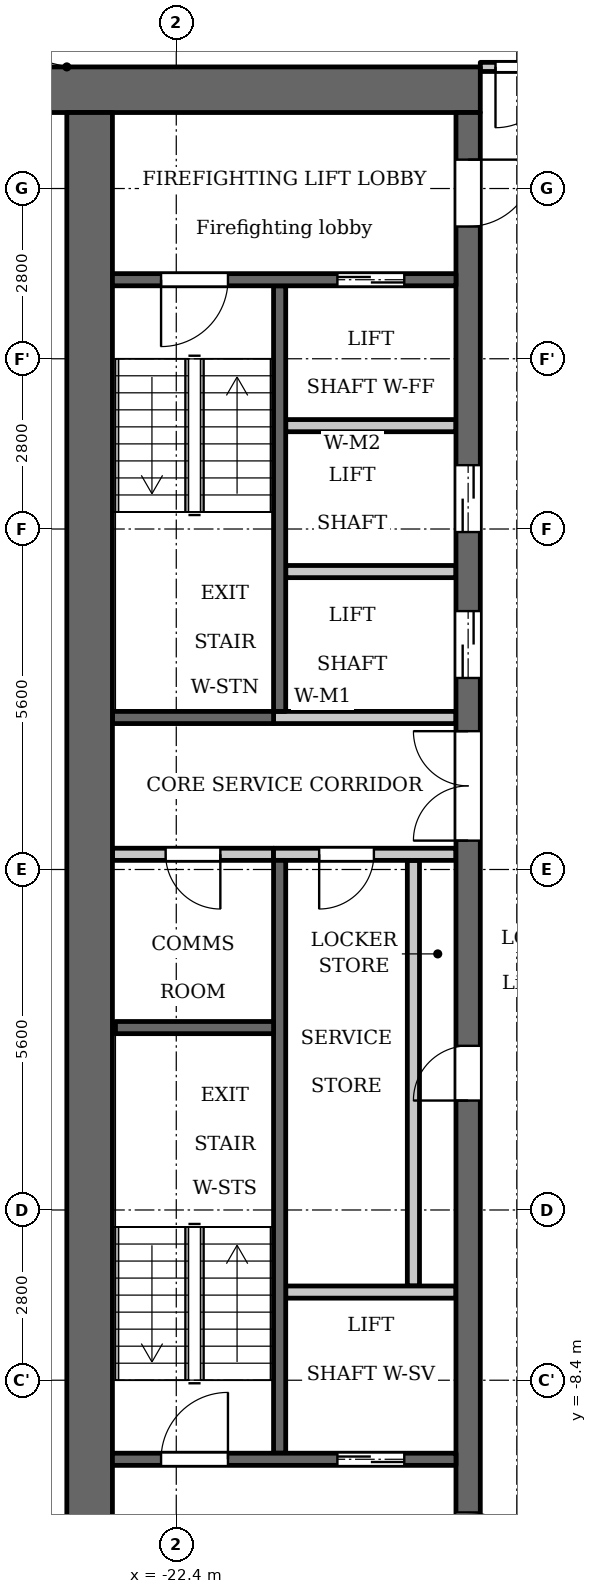
"""IFC4 building model, lengths in metres.
Left out: names, types, materials, properties, quantities, classifications, styles, units other than length and angle.
Written with IfcOpenShell. Run it as: python <this file> out.ifc"""

import sys

from ifc_helpers import new_model, si_unit, direction, frame, frame_2d, origin, place, context, subcontext, project, spatial, rectangle, extrude, element, fill, save


model = new_model("IFC4")
c1 = context("Model", 3, precision=1e-05, world=origin(), true_north=direction((0.0, 1.0)))
c2 = subcontext(c1, "Body", "Model", "MODEL_VIEW")
j1 = project(units=[si_unit("LENGTHUNIT", "METRE"), si_unit("PLANEANGLEUNIT", "RADIAN")], contexts=[c1])
p1 = place(None, origin())
s1 = spatial("IfcSite", under=j1, at=p1, CompositionType="ELEMENT")
p2 = place(p1, origin())
s2 = spatial("IfcBuilding", under=s1, at=p2, CompositionType="ELEMENT")
p3 = place(p2, frame((0.0, 0.0, 202.9)))
s3 = spatial("IfcBuildingStorey", under=s2, at=p3, CompositionType="ELEMENT", Elevation=202.9)
p4 = place(p3, frame((-20.7, 2.6, 0.0), z_axis=(0.0, 0.0, 1.0), x_axis=(0.0, 1.0, 0.0)))
e1 = element("IfcWall", 1, at=p4, inside=s3, PredefinedType="SHEAR", context=c2, shape_type="SweptSolid", body=[
    extrude(rectangle(XDim=7.0, YDim=0.2, at=frame_2d((3.5, 0.0))), origin(), (0.0, 0.0, 1.0), 3.2),
])
p5 = place(p3, frame((-20.7, -9.6, 0.0), z_axis=(0.0, 0.0, 1.0), x_axis=(0.0, 1.0, 0.0)))
e2 = element("IfcWall", 2, at=p5, inside=s3, PredefinedType="SHEAR", context=c2, shape_type="SweptSolid", body=[
    extrude(rectangle(XDim=9.75, YDim=0.2, at=frame_2d((4.875, 0.0))), origin(), (0.0, 0.0, 1.0), 3.2),
])
p6 = place(p3, frame((-20.8, 2.5, 0.0), z_axis=(0.0, 0.0, 1.0), x_axis=(-1.0, 0.0, 0.0)))
e3 = element("IfcWall", 3, at=p6, inside=s3, PredefinedType="SHEAR", context=c2, shape_type="SweptSolid", body=[
    extrude(rectangle(XDim=2.65, YDim=0.2, at=frame_2d((1.325, 0.0))), origin(), (0.0, 0.0, 1.0), 3.2),
])
p7 = place(p3, frame((-20.8, 0.25, 0.0), z_axis=(0.0, 0.0, 1.0), x_axis=(-1.0, 0.0, 0.0)))
e4 = element("IfcWall", 4, at=p7, inside=s3, PredefinedType="PARTITIONING", context=c2, shape_type="SweptSolid", body=[
    extrude(rectangle(XDim=2.65, YDim=0.2, at=frame_2d((1.325, 0.0))), origin(), (0.0, 0.0, 1.0), 3.2),
])
p8 = place(p7, frame((0.875, 0.0, 0.0)))
e5 = element("IfcOpeningElement", 5, at=p8, cuts=e4, PredefinedType="OPENING", context=c2, shape_type="SweptSolid", body=[
    extrude(rectangle(XDim=0.9, YDim=2.1, at=frame_2d((0.45, 1.05))), frame((0.0, 0.11, 0.0), z_axis=(0.0, -1.0, 0.0), x_axis=(1.0, 0.0, 0.0)), (0.0, 0.0, 1.0), 0.22),
])
p9 = place(p3, frame((-17.4, 12.825, 0.0), z_axis=(0.0, 0.0, 1.0), x_axis=(-1.0, 0.0, 0.0)))
e6 = element("IfcWall", 6, at=p9, inside=s3, PredefinedType="SHEAR", context=c2, shape_type="SweptSolid", body=[
    extrude(rectangle(XDim=7.6, YDim=0.75, at=frame_2d((3.8, 0.0))), origin(), (0.0, 0.0, 1.0), 3.2),
])
p10 = place(p3, frame((-18.5, -6.85, 0.0), z_axis=(0.0, 0.0, 1.0), x_axis=(0.0, 1.0, 0.0)))
e7 = element("IfcWall", 7, at=p10, inside=s3, PredefinedType="PARTITIONING", context=c2, shape_type="SweptSolid", body=[
    extrude(rectangle(XDim=7.0, YDim=0.2, at=frame_2d((3.5, 0.0))), origin(), (0.0, 0.0, 1.0), 3.2),
])
p11 = place(p3, frame((-17.6, -12.45, 0.0), z_axis=(0.0, 0.0, 1.0), x_axis=(0.0, 1.0, 0.0)))
e8 = element("IfcWall", 8, at=p11, inside=s3, PredefinedType="SHEAR", context=c2, shape_type="SweptSolid", body=[
    extrude(rectangle(XDim=24.9, YDim=0.4, at=frame_2d((12.45, 0.0))), origin(), (0.0, 0.0, 1.0), 3.2),
])
p12 = place(p11, frame((8.65, 0.0, 0.0)))
e9 = element("IfcOpeningElement", 9, at=p12, cuts=e8, PredefinedType="OPENING", context=c2, shape_type="SweptSolid", body=[
    extrude(rectangle(XDim=0.9, YDim=2.1, at=frame_2d((0.45, 1.05))), frame((0.0, 0.21, 0.0), z_axis=(0.0, -1.0, 0.0), x_axis=(1.0, 0.0, 0.0)), (0.0, 0.0, 1.0), 0.42),
])
p13 = place(p11, frame((15.6, 0.0, 0.0)))
e10 = element("IfcOpeningElement", 10, at=p13, cuts=e8, PredefinedType="OPENING", context=c2, shape_type="SweptSolid", body=[
    extrude(rectangle(XDim=1.1, YDim=2.1, at=frame_2d((0.55, 1.05))), frame((0.0, 0.21, 0.0), z_axis=(0.0, -1.0, 0.0), x_axis=(1.0, 0.0, 0.0)), (0.0, 0.0, 1.0), 0.42),
])
p14 = place(p11, frame((18.0, 0.0, 0.0)))
e11 = element("IfcOpeningElement", 11, at=p14, cuts=e8, PredefinedType="OPENING", context=c2, shape_type="SweptSolid", body=[
    extrude(rectangle(XDim=1.1, YDim=2.1, at=frame_2d((0.55, 1.05))), frame((0.0, 0.21, 0.0), z_axis=(0.0, -1.0, 0.0), x_axis=(1.0, 0.0, 0.0)), (0.0, 0.0, 1.0), 0.42),
])
p15 = place(p11, frame((23.025, 0.0, 0.0)))
e12 = element("IfcOpeningElement", 12, at=p15, cuts=e8, PredefinedType="OPENING", context=c2, shape_type="SweptSolid", body=[
    extrude(rectangle(XDim=1.1, YDim=2.1, at=frame_2d((0.55, 1.05))), frame((0.0, 0.21, 0.0), z_axis=(0.0, -1.0, 0.0), x_axis=(1.0, 0.0, 0.0)), (0.0, 0.0, 1.0), 0.42),
])
p16 = place(p11, frame((0.775, 0.0, 0.0)))
e13 = element("IfcOpeningElement", 13, at=p16, cuts=e8, PredefinedType="OPENING", context=c2, shape_type="SweptSolid", body=[
    extrude(rectangle(XDim=1.1, YDim=2.1, at=frame_2d((0.55, 1.05))), frame((0.0, 0.21, 0.0), z_axis=(0.0, -1.0, 0.0), x_axis=(1.0, 0.0, 0.0)), (0.0, 0.0, 1.0), 0.42),
])
p17 = place(p11, frame((12.925, 0.0, 0.0)))
e14 = element("IfcOpeningElement", 14, at=p17, cuts=e8, PredefinedType="OPENING", context=c2, shape_type="SweptSolid", body=[
    extrude(rectangle(XDim=1.8, YDim=2.1, at=frame_2d((0.9, 1.05))), frame((0.0, 0.21, 0.0), z_axis=(0.0, -1.0, 0.0), x_axis=(1.0, 0.0, 0.0)), (0.0, 0.0, 1.0), 0.42),
])
p18 = place(p3, frame((-23.825, -12.45, 0.0), z_axis=(0.0, 0.0, 1.0), x_axis=(0.0, 1.0, 0.0)))
e15 = element("IfcWall", 15, at=p18, inside=s3, PredefinedType="SHEAR", context=c2, shape_type="SweptSolid", body=[
    extrude(rectangle(XDim=24.9, YDim=0.75, at=frame_2d((12.45, 0.0))), origin(), (0.0, 0.0, 1.0), 3.2),
])
p19 = place(p3, frame((-17.8, -9.7, 0.0), z_axis=(0.0, 0.0, 1.0), x_axis=(-1.0, 0.0, 0.0)))
e16 = element("IfcWall", 16, at=p19, inside=s3, PredefinedType="SHEAR", context=c2, shape_type="SweptSolid", body=[
    extrude(rectangle(XDim=5.65, YDim=0.2, at=frame_2d((2.825, 0.0))), origin(), (0.0, 0.0, 1.0), 3.2),
])
p20 = place(p19, frame((0.85, 0.0, 0.0)))
e17 = element("IfcOpeningElement", 17, at=p20, cuts=e16, PredefinedType="OPENING", context=c2, shape_type="SweptSolid", body=[
    extrude(rectangle(XDim=1.1, YDim=2.1, at=frame_2d((0.55, 1.05))), frame((0.0, 0.11, 0.0), z_axis=(0.0, -1.0, 0.0), x_axis=(1.0, 0.0, 0.0)), (0.0, 0.0, 1.0), 0.22),
])
p21 = place(p19, frame((3.75, 0.0, 0.0)))
e18 = element("IfcOpeningElement", 18, at=p21, cuts=e16, PredefinedType="OPENING", context=c2, shape_type="SweptSolid", body=[
    extrude(rectangle(XDim=1.1, YDim=2.1, at=frame_2d((0.55, 1.05))), frame((0.0, 0.11, 0.0), z_axis=(0.0, -1.0, 0.0), x_axis=(1.0, 0.0, 0.0)), (0.0, 0.0, 1.0), 0.22),
])
p22 = place(p3, frame((-17.8, -6.95, 0.0), z_axis=(0.0, 0.0, 1.0), x_axis=(-1.0, 0.0, 0.0)))
e19 = element("IfcWall", 19, at=p22, inside=s3, PredefinedType="PARTITIONING", context=c2, shape_type="SweptSolid", body=[
    extrude(rectangle(XDim=2.8, YDim=0.2, at=frame_2d((1.4, 0.0))), origin(), (0.0, 0.0, 1.0), 3.2),
])
p23 = place(p3, frame((-17.8, 0.25, 0.0), z_axis=(0.0, 0.0, 1.0), x_axis=(-1.0, 0.0, 0.0)))
e20 = element("IfcWall", 20, at=p23, inside=s3, PredefinedType="PARTITIONING", context=c2, shape_type="SweptSolid", body=[
    extrude(rectangle(XDim=3.0, YDim=0.2, at=frame_2d((1.5, 0.0))), origin(), (0.0, 0.0, 1.0), 3.2),
])
p24 = place(p23, frame((1.35, 0.0, 0.0)))
e21 = element("IfcOpeningElement", 21, at=p24, cuts=e20, PredefinedType="OPENING", context=c2, shape_type="SweptSolid", body=[
    extrude(rectangle(XDim=0.9, YDim=2.1, at=frame_2d((0.45, 1.05))), frame((0.0, 0.11, 0.0), z_axis=(0.0, -1.0, 0.0), x_axis=(1.0, 0.0, 0.0)), (0.0, 0.0, 1.0), 0.22),
])
p25 = place(p3, frame((-17.8, 2.5, 0.0), z_axis=(0.0, 0.0, 1.0), x_axis=(-1.0, 0.0, 0.0)))
e22 = element("IfcWall", 22, at=p25, inside=s3, PredefinedType="PARTITIONING", context=c2, shape_type="SweptSolid", body=[
    extrude(rectangle(XDim=3.0, YDim=0.2, at=frame_2d((1.5, 0.0))), origin(), (0.0, 0.0, 1.0), 3.2),
])
for number, where, z_axis, x_axis in (
    (23, (-17.8, 4.9, 0.0), (0.0, 0.0, 1.0), (-1.0, 0.0, 0.0)),
    (24, (-17.8, 7.3, 0.0), (0.0, 0.0, 1.0), (-1.0, 0.0, 0.0)),
):
    element("IfcWall", number, at=place(p3, frame(where, z_axis=z_axis, x_axis=x_axis)), inside=s3, PredefinedType="PARTITIONING", context=c2, shape_type="SweptSolid", body=[
        extrude(rectangle(XDim=2.8, YDim=0.2, at=frame_2d((1.4, 0.0))), origin(), (0.0, 0.0, 1.0), 3.2),
    ])
p26 = place(p3, frame((-17.8, 9.7, 0.0), z_axis=(0.0, 0.0, 1.0), x_axis=(-1.0, 0.0, 0.0)))
e25 = element("IfcWall", 25, at=p26, inside=s3, PredefinedType="SHEAR", context=c2, shape_type="SweptSolid", body=[
    extrude(rectangle(XDim=5.65, YDim=0.2, at=frame_2d((2.825, 0.0))), origin(), (0.0, 0.0, 1.0), 3.2),
])
p27 = place(p26, frame((0.85, 0.0, 0.0)))
e26 = element("IfcOpeningElement", 26, at=p27, cuts=e25, PredefinedType="OPENING", context=c2, shape_type="SweptSolid", body=[
    extrude(rectangle(XDim=1.1, YDim=2.1, at=frame_2d((0.55, 1.05))), frame((0.0, 0.11, 0.0), z_axis=(0.0, -1.0, 0.0), x_axis=(1.0, 0.0, 0.0)), (0.0, 0.0, 1.0), 0.22),
])
p28 = place(p26, frame((3.75, 0.0, 0.0)))
e27 = element("IfcOpeningElement", 27, at=p28, cuts=e25, PredefinedType="OPENING", context=c2, shape_type="SweptSolid", body=[
    extrude(rectangle(XDim=1.1, YDim=2.1, at=frame_2d((0.55, 1.05))), frame((0.0, 0.11, 0.0), z_axis=(0.0, -1.0, 0.0), x_axis=(1.0, 0.0, 0.0)), (0.0, 0.0, 1.0), 0.22),
])
p29 = place(p3, frame((-20.8, -2.6, 0.0), z_axis=(0.0, 0.0, 1.0), x_axis=(-1.0, 0.0, 0.0)))
e28 = element("IfcWall", 28, at=p29, inside=s3, PredefinedType="SHEAR", context=c2, shape_type="SweptSolid", body=[
    extrude(rectangle(XDim=2.6, YDim=0.2, at=frame_2d((1.3, 0.0))), origin(), (0.0, 0.0, 1.0), 3.2),
])
p30 = place(p3, frame((-17.4, 13.2, 0.0), z_axis=(0.0, 0.0, 1.0), x_axis=(1.0, 0.0, 0.0)))
e29 = element("IfcWall", 29, at=p30, inside=s3, PredefinedType="PARTITIONING", context=c2, shape_type="SweptSolid", body=[
    extrude(rectangle(XDim=34.8, YDim=0.15, at=frame_2d((17.4, 0.0))), origin(), (0.0, 0.0, 1.0), 3.2),
])
p31 = place(p30, frame((0.25, 0.0, 0.0)))
e30 = element("IfcOpeningElement", 30, at=p31, cuts=e29, PredefinedType="OPENING", context=c2, shape_type="SweptSolid", body=[
    extrude(rectangle(XDim=1.0, YDim=2.1, at=frame_2d((0.5, 1.05))), frame((0.0, 0.085, 0.0), z_axis=(0.0, -1.0, 0.0), x_axis=(1.0, 0.0, 0.0)), (0.0, 0.0, 1.0), 0.17),
])
p32 = place(p30, frame((33.65, 0.0, 0.0)))
e31 = element("IfcOpeningElement", 31, at=p32, cuts=e29, PredefinedType="OPENING", context=c2, shape_type="SweptSolid", body=[
    extrude(rectangle(XDim=1.0, YDim=2.1, at=frame_2d((0.5, 1.05))), frame((0.0, 0.085, 0.0), z_axis=(0.0, -1.0, 0.0), x_axis=(1.0, 0.0, 0.0)), (0.0, 0.0, 1.0), 0.17),
])
p33 = place(p20, origin())
e32 = element("IfcDoor", 32, at=p33, inside=s3, OperationType="DOUBLE_DOOR_SLIDING", PredefinedType="DOOR", context=c2, shape_type="SweptSolid", body=[
    extrude(rectangle(XDim=1.1, YDim=2.1, at=frame_2d((0.55, 1.05))), frame((0.0, 0.025, 0.0), z_axis=(0.0, -1.0, 0.0), x_axis=(1.0, 0.0, 0.0)), (0.0, 0.0, 1.0), 0.05),
])
fill(e17, e32)
p34 = place(p12, origin())
e33 = element("IfcDoor", 33, at=p34, inside=s3, OperationType="SINGLE_SWING_RIGHT", PredefinedType="DOOR", context=c2, shape_type="SweptSolid", body=[
    extrude(rectangle(XDim=0.9, YDim=2.1, at=frame_2d((0.45, 1.05))), frame((0.0, 0.025, 0.0), z_axis=(0.0, -1.0, 0.0), x_axis=(1.0, 0.0, 0.0)), (0.0, 0.0, 1.0), 0.05),
])
fill(e9, e33)
p35 = place(p24, origin())
e34 = element("IfcDoor", 34, at=p35, inside=s3, OperationType="SINGLE_SWING_LEFT", PredefinedType="DOOR", context=c2, shape_type="SweptSolid", body=[
    extrude(rectangle(XDim=0.9, YDim=2.1, at=frame_2d((0.45, 1.05))), frame((0.0, 0.025, 0.0), z_axis=(0.0, -1.0, 0.0), x_axis=(1.0, 0.0, 0.0)), (0.0, 0.0, 1.0), 0.05),
])
fill(e21, e34)
p36 = place(p13, origin())
e35 = element("IfcDoor", 35, at=p36, inside=s3, OperationType="DOUBLE_DOOR_SLIDING", PredefinedType="DOOR", context=c2, shape_type="SweptSolid", body=[
    extrude(rectangle(XDim=1.1, YDim=2.1, at=frame_2d((0.55, 1.05))), frame((0.0, 0.025, 0.0), z_axis=(0.0, -1.0, 0.0), x_axis=(1.0, 0.0, 0.0)), (0.0, 0.0, 1.0), 0.05),
])
fill(e10, e35)
p37 = place(p14, origin())
e36 = element("IfcDoor", 36, at=p37, inside=s3, OperationType="DOUBLE_DOOR_SLIDING", PredefinedType="DOOR", context=c2, shape_type="SweptSolid", body=[
    extrude(rectangle(XDim=1.1, YDim=2.1, at=frame_2d((0.55, 1.05))), frame((0.0, 0.025, 0.0), z_axis=(0.0, -1.0, 0.0), x_axis=(1.0, 0.0, 0.0)), (0.0, 0.0, 1.0), 0.05),
])
fill(e11, e36)
p38 = place(p27, origin())
e37 = element("IfcDoor", 37, at=p38, inside=s3, OperationType="DOUBLE_DOOR_SLIDING", PredefinedType="DOOR", context=c2, shape_type="SweptSolid", body=[
    extrude(rectangle(XDim=1.1, YDim=2.1, at=frame_2d((0.55, 1.05))), frame((0.0, 0.025, 0.0), z_axis=(0.0, -1.0, 0.0), x_axis=(1.0, 0.0, 0.0)), (0.0, 0.0, 1.0), 0.05),
])
fill(e26, e37)
p39 = place(p15, origin())
e38 = element("IfcDoor", 38, at=p39, inside=s3, OperationType="SINGLE_SWING_RIGHT", PredefinedType="DOOR", context=c2, shape_type="SweptSolid", body=[
    extrude(rectangle(XDim=1.1, YDim=2.1, at=frame_2d((0.55, 1.05))), frame((0.0, 0.025, 0.0), z_axis=(0.0, -1.0, 0.0), x_axis=(1.0, 0.0, 0.0)), (0.0, 0.0, 1.0), 0.05),
])
fill(e12, e38)
p40 = place(p16, origin())
e39 = element("IfcDoor", 39, at=p40, inside=s3, OperationType="SINGLE_SWING_LEFT", PredefinedType="DOOR", context=c2, shape_type="SweptSolid", body=[
    extrude(rectangle(XDim=1.1, YDim=2.1, at=frame_2d((0.55, 1.05))), frame((0.0, 0.025, 0.0), z_axis=(0.0, -1.0, 0.0), x_axis=(1.0, 0.0, 0.0)), (0.0, 0.0, 1.0), 0.05),
])
fill(e13, e39)
p41 = place(p28, origin())
e40 = element("IfcDoor", 40, at=p41, inside=s3, OperationType="SINGLE_SWING_LEFT", PredefinedType="DOOR", context=c2, shape_type="SweptSolid", body=[
    extrude(rectangle(XDim=1.1, YDim=2.1, at=frame_2d((0.55, 1.05))), frame((0.0, 0.025, 0.0), z_axis=(0.0, -1.0, 0.0), x_axis=(1.0, 0.0, 0.0)), (0.0, 0.0, 1.0), 0.05),
])
fill(e27, e40)
p42 = place(p21, origin())
e41 = element("IfcDoor", 41, at=p42, inside=s3, OperationType="SINGLE_SWING_LEFT", PredefinedType="DOOR", context=c2, shape_type="SweptSolid", body=[
    extrude(rectangle(XDim=1.1, YDim=2.1, at=frame_2d((0.55, 1.05))), frame((0.0, 0.025, 0.0), z_axis=(0.0, -1.0, 0.0), x_axis=(1.0, 0.0, 0.0)), (0.0, 0.0, 1.0), 0.05),
])
fill(e18, e41)
p43 = place(p17, origin())
e42 = element("IfcDoor", 42, at=p43, inside=s3, OperationType="DOUBLE_DOOR_SINGLE_SWING", PredefinedType="DOOR", context=c2, shape_type="SweptSolid", body=[
    extrude(rectangle(XDim=1.8, YDim=2.1, at=frame_2d((0.9, 1.05))), frame((0.0, 0.025, 0.0), z_axis=(0.0, -1.0, 0.0), x_axis=(1.0, 0.0, 0.0)), (0.0, 0.0, 1.0), 0.05),
])
fill(e14, e42)
p44 = place(p8, origin())
e43 = element("IfcDoor", 43, at=p44, inside=s3, OperationType="SINGLE_SWING_RIGHT", PredefinedType="DOOR", context=c2, shape_type="SweptSolid", body=[
    extrude(rectangle(XDim=0.9, YDim=2.1, at=frame_2d((0.45, 1.05))), frame((0.0, 0.025, 0.0), z_axis=(0.0, -1.0, 0.0), x_axis=(1.0, 0.0, 0.0)), (0.0, 0.0, 1.0), 0.05),
])
fill(e5, e43)
p45 = place(p31, origin())
e44 = element("IfcDoor", 44, at=p45, inside=s3, OperationType="SINGLE_SWING_LEFT", PredefinedType="DOOR", context=c2, shape_type="SweptSolid", body=[
    extrude(rectangle(XDim=1.0, YDim=2.1, at=frame_2d((0.5, 1.05))), frame((0.0, 0.025, 0.0), z_axis=(0.0, -1.0, 0.0), x_axis=(1.0, 0.0, 0.0)), (0.0, 0.0, 1.0), 0.05),
])
fill(e30, e44)
save(model, sys.argv[1])
